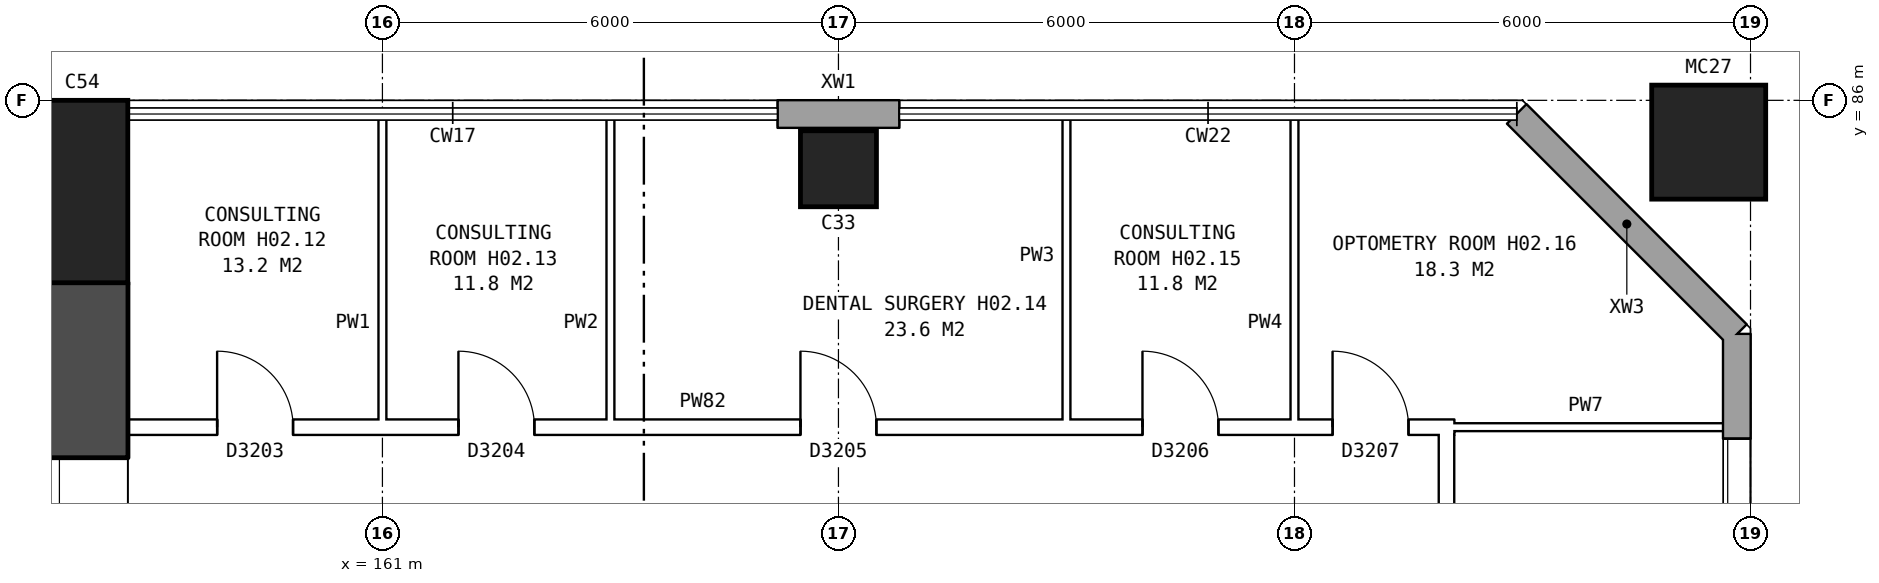
"""IFC4 building model, lengths in metres.
Left out: names, types, materials, properties, quantities, classifications, styles, units other than length and angle.
Written with IfcOpenShell. Run it as: python <this file> out.ifc"""

import sys

from ifc_helpers import new_model, si_unit, direction, frame, frame_2d, origin, origin_2d, place, context, subcontext, project, spatial, rectangle, hollow_rectangle, extrude, element, fill, save


model = new_model("IFC4")
c1 = context("Model", 3, precision=1e-05, world=origin(), true_north=direction((0.0, 1.0)))
c2 = subcontext(c1, "Body", "Model", "MODEL_VIEW")
j1 = project(units=[si_unit("LENGTHUNIT", "METRE"), si_unit("PLANEANGLEUNIT", "RADIAN")], contexts=[c1])
p1 = place(None, origin())
s1 = spatial("IfcSite", under=j1, at=p1, CompositionType="ELEMENT")
p2 = place(p1, origin())
s2 = spatial("IfcBuilding", under=s1, at=p2, CompositionType="ELEMENT")
p3 = place(p2, frame((0.0, 0.0, 10.1)))
s3 = spatial("IfcBuildingStorey", under=s2, at=p3, CompositionType="ELEMENT", Elevation=10.1)
p4 = place(p3, frame((157.05, 84.8, -0.3), z_axis=(0.0, 0.0, 1.0), x_axis=(1.0, 0.0, 0.0)))
e1 = element("IfcColumn", 1, at=p4, inside=s3, PredefinedType="COLUMN", context=c2, shape_type="SweptSolid", body=[
    extrude(rectangle(XDim=1.2, YDim=2.4, at=origin_2d()), origin(), (0.0, 0.0, 1.0), 4.4),
])
p5 = place(p3, frame((157.05, 56.4, -0.3), z_axis=(0.0, 0.0, 1.0), x_axis=(0.0, 1.0, 0.0)))
e2 = element("IfcWall", 2, at=p5, inside=s3, PredefinedType="SHEAR", context=c2, shape_type="SweptSolid", body=[
    extrude(rectangle(XDim=27.2, YDim=1.2, at=frame_2d((13.6, 0.0))), origin(), (0.0, 0.0, 1.0), 4.4),
])
p6 = place(p5, frame((2.3, 0.0, 0.8)))
e3 = element("IfcOpeningElement", 3, at=p6, cuts=e2, PredefinedType="OPENING", context=c2, shape_type="SweptSolid", body=[
    extrude(rectangle(XDim=1.6, YDim=1.8, at=frame_2d((0.8, 0.9))), frame((0.0, 0.61, 0.0), z_axis=(0.0, -1.0, 0.0), x_axis=(1.0, 0.0, 0.0)), (0.0, 0.0, 1.0), 1.22),
])
p7 = place(p5, frame((5.3, 0.0, 0.8)))
e4 = element("IfcOpeningElement", 4, at=p7, cuts=e2, PredefinedType="OPENING", context=c2, shape_type="SweptSolid", body=[
    extrude(rectangle(XDim=1.6, YDim=1.8, at=frame_2d((0.8, 0.9))), frame((0.0, 0.61, 0.0), z_axis=(0.0, -1.0, 0.0), x_axis=(1.0, 0.0, 0.0)), (0.0, 0.0, 1.0), 1.22),
])
p8 = place(p5, frame((8.3, 0.0, 0.8)))
e5 = element("IfcOpeningElement", 5, at=p8, cuts=e2, PredefinedType="OPENING", context=c2, shape_type="SweptSolid", body=[
    extrude(rectangle(XDim=1.6, YDim=1.8, at=frame_2d((0.8, 0.9))), frame((0.0, 0.61, 0.0), z_axis=(0.0, -1.0, 0.0), x_axis=(1.0, 0.0, 0.0)), (0.0, 0.0, 1.0), 1.22),
])
p9 = place(p5, frame((11.3, 0.0, 0.8)))
e6 = element("IfcOpeningElement", 6, at=p9, cuts=e2, PredefinedType="OPENING", context=c2, shape_type="SweptSolid", body=[
    extrude(rectangle(XDim=1.6, YDim=1.8, at=frame_2d((0.8, 0.9))), frame((0.0, 0.61, 0.0), z_axis=(0.0, -1.0, 0.0), x_axis=(1.0, 0.0, 0.0)), (0.0, 0.0, 1.0), 1.22),
])
p10 = place(p5, frame((14.3, 0.0, 0.8)))
e7 = element("IfcOpeningElement", 7, at=p10, cuts=e2, PredefinedType="OPENING", context=c2, shape_type="SweptSolid", body=[
    extrude(rectangle(XDim=1.6, YDim=1.8, at=frame_2d((0.8, 0.9))), frame((0.0, 0.61, 0.0), z_axis=(0.0, -1.0, 0.0), x_axis=(1.0, 0.0, 0.0)), (0.0, 0.0, 1.0), 1.22),
])
p11 = place(p5, frame((17.3, 0.0, 0.8)))
e8 = element("IfcOpeningElement", 8, at=p11, cuts=e2, PredefinedType="OPENING", context=c2, shape_type="SweptSolid", body=[
    extrude(rectangle(XDim=1.6, YDim=1.8, at=frame_2d((0.8, 0.9))), frame((0.0, 0.61, 0.0), z_axis=(0.0, -1.0, 0.0), x_axis=(1.0, 0.0, 0.0)), (0.0, 0.0, 1.0), 1.22),
])
p12 = place(p5, frame((20.3, 0.0, 0.8)))
e9 = element("IfcOpeningElement", 9, at=p12, cuts=e2, PredefinedType="OPENING", context=c2, shape_type="SweptSolid", body=[
    extrude(rectangle(XDim=1.6, YDim=1.8, at=frame_2d((0.8, 0.9))), frame((0.0, 0.61, 0.0), z_axis=(0.0, -1.0, 0.0), x_axis=(1.0, 0.0, 0.0)), (0.0, 0.0, 1.0), 1.22),
])
p13 = place(p5, frame((23.3, 0.0, 0.8)))
e10 = element("IfcOpeningElement", 10, at=p13, cuts=e2, PredefinedType="OPENING", context=c2, shape_type="SweptSolid", body=[
    extrude(rectangle(XDim=1.6, YDim=1.8, at=frame_2d((0.8, 0.9))), frame((0.0, 0.61, 0.0), z_axis=(0.0, -1.0, 0.0), x_axis=(1.0, 0.0, 0.0)), (0.0, 0.0, 1.0), 1.22),
])
p14 = place(p3, frame((167.0, 85.1, 0.0), z_axis=(0.0, 0.0, 1.0), x_axis=(1.0, 0.0, 0.0)))
e11 = element("IfcColumn", 11, at=p14, inside=s3, PredefinedType="COLUMN", context=c2, shape_type="SweptSolid", body=[
    extrude(rectangle(XDim=1.0, YDim=1.0, at=origin_2d()), origin(), (0.0, 0.0, 1.0), 4.3),
])
p15 = place(p3, frame((178.45, 85.45, 0.0), z_axis=(0.0, 0.0, 1.0), x_axis=(1.0, 0.0, 0.0)))
e12 = element("IfcColumn", 12, at=p15, inside=s3, PredefinedType="COLUMN", context=c2, shape_type="SweptSolid", body=[
    extrude(hollow_rectangle(XDim=1.5, YDim=1.5, WallThickness=0.08, at=origin_2d()), origin(), (0.0, 0.0, 1.0), 4.6),
])
p16 = place(p3, frame((178.82, 57.075, 0.0), z_axis=(0.0, 0.0, 1.0), x_axis=(0.0, 1.0, 0.0)))
e13 = element("IfcWall", 13, at=p16, inside=s3, PredefinedType="STANDARD", context=c2, shape_type="SweptSolid", body=[
    extrude(rectangle(XDim=25.851, YDim=0.36, at=frame_2d((12.925, 0.0))), origin(), (0.0, 0.0, 1.0), 4.3),
])
p17 = place(p16, frame((1.375, 0.0, 0.8)))
e14 = element("IfcOpeningElement", 14, at=p17, cuts=e13, PredefinedType="OPENING", context=c2, shape_type="SweptSolid", body=[
    extrude(rectangle(XDim=1.6, YDim=1.5, at=frame_2d((0.8, 0.75))), frame((0.0, 0.19, 0.0), z_axis=(0.0, -1.0, 0.0), x_axis=(1.0, 0.0, 0.0)), (0.0, 0.0, 1.0), 0.38),
])
p18 = place(p16, frame((4.375, 0.0, 0.8)))
e15 = element("IfcOpeningElement", 15, at=p18, cuts=e13, PredefinedType="OPENING", context=c2, shape_type="SweptSolid", body=[
    extrude(rectangle(XDim=0.6, YDim=0.9, at=frame_2d((0.3, 0.45))), frame((0.0, 0.19, 0.0), z_axis=(0.0, -1.0, 0.0), x_axis=(1.0, 0.0, 0.0)), (0.0, 0.0, 1.0), 0.38),
])
p19 = place(p16, frame((7.375, 0.0, 1.7)))
e16 = element("IfcOpeningElement", 16, at=p19, cuts=e13, PredefinedType="OPENING", context=c2, shape_type="SweptSolid", body=[
    extrude(rectangle(XDim=1.0, YDim=0.9, at=frame_2d((0.5, 0.45))), frame((0.0, 0.19, 0.0), z_axis=(0.0, -1.0, 0.0), x_axis=(1.0, 0.0, 0.0)), (0.0, 0.0, 1.0), 0.38),
])
p20 = place(p16, frame((10.625, 0.0, 0.8)))
e17 = element("IfcOpeningElement", 17, at=p20, cuts=e13, PredefinedType="OPENING", context=c2, shape_type="SweptSolid", body=[
    extrude(rectangle(XDim=1.6, YDim=1.8, at=frame_2d((0.8, 0.9))), frame((0.0, 0.19, 0.0), z_axis=(0.0, -1.0, 0.0), x_axis=(1.0, 0.0, 0.0)), (0.0, 0.0, 1.0), 0.38),
])
p21 = place(p16, frame((13.625, 0.0, 0.8)))
e18 = element("IfcOpeningElement", 18, at=p21, cuts=e13, PredefinedType="OPENING", context=c2, shape_type="SweptSolid", body=[
    extrude(rectangle(XDim=1.6, YDim=1.8, at=frame_2d((0.8, 0.9))), frame((0.0, 0.19, 0.0), z_axis=(0.0, -1.0, 0.0), x_axis=(1.0, 0.0, 0.0)), (0.0, 0.0, 1.0), 0.38),
])
p22 = place(p16, frame((16.375, 0.0, 1.4)))
e19 = element("IfcOpeningElement", 19, at=p22, cuts=e13, PredefinedType="OPENING", context=c2, shape_type="SweptSolid", body=[
    extrude(rectangle(XDim=1.0, YDim=1.2, at=frame_2d((0.5, 0.6))), frame((0.0, 0.19, 0.0), z_axis=(0.0, -1.0, 0.0), x_axis=(1.0, 0.0, 0.0)), (0.0, 0.0, 1.0), 0.38),
])
p23 = place(p16, frame((20.725, 0.0, 0.8)))
e20 = element("IfcOpeningElement", 20, at=p23, cuts=e13, PredefinedType="OPENING", context=c2, shape_type="SweptSolid", body=[
    extrude(rectangle(XDim=0.6, YDim=0.9, at=frame_2d((0.3, 0.45))), frame((0.0, 0.19, 0.0), z_axis=(0.0, -1.0, 0.0), x_axis=(1.0, 0.0, 0.0)), (0.0, 0.0, 1.0), 0.38),
])
p24 = place(p16, frame((21.775, 0.0, 0.8)))
e21 = element("IfcOpeningElement", 21, at=p24, cuts=e13, PredefinedType="OPENING", context=c2, shape_type="SweptSolid", body=[
    extrude(rectangle(XDim=0.8, YDim=1.2, at=frame_2d((0.4, 0.6))), frame((0.0, 0.19, 0.0), z_axis=(0.0, -1.0, 0.0), x_axis=(1.0, 0.0, 0.0)), (0.0, 0.0, 1.0), 0.38),
])
p25 = place(p16, frame((3.275, 0.0, 0.8)))
e22 = element("IfcOpeningElement", 22, at=p25, cuts=e13, PredefinedType="OPENING", context=c2, shape_type="SweptSolid", body=[
    extrude(rectangle(XDim=0.8, YDim=1.2, at=frame_2d((0.4, 0.6))), frame((0.0, 0.19, 0.0), z_axis=(0.0, -1.0, 0.0), x_axis=(1.0, 0.0, 0.0)), (0.0, 0.0, 1.0), 0.38),
])
p26 = place(p16, frame((8.675, 0.0, 1.4)))
e23 = element("IfcOpeningElement", 23, at=p26, cuts=e13, PredefinedType="OPENING", context=c2, shape_type="SweptSolid", body=[
    extrude(rectangle(XDim=1.6, YDim=1.2, at=frame_2d((0.8, 0.6))), frame((0.0, 0.19, 0.0), z_axis=(0.0, -1.0, 0.0), x_axis=(1.0, 0.0, 0.0)), (0.0, 0.0, 1.0), 0.38),
])
p27 = place(p16, frame((17.675, 0.0, 1.7)))
e24 = element("IfcOpeningElement", 24, at=p27, cuts=e13, PredefinedType="OPENING", context=c2, shape_type="SweptSolid", body=[
    extrude(rectangle(XDim=0.8, YDim=0.9, at=frame_2d((0.4, 0.45))), frame((0.0, 0.19, 0.0), z_axis=(0.0, -1.0, 0.0), x_axis=(1.0, 0.0, 0.0)), (0.0, 0.0, 1.0), 0.38),
])
p28 = place(p16, frame((22.875, 0.0, 0.8)))
e25 = element("IfcOpeningElement", 25, at=p28, cuts=e13, PredefinedType="OPENING", context=c2, shape_type="SweptSolid", body=[
    extrude(rectangle(XDim=1.6, YDim=1.5, at=frame_2d((0.8, 0.75))), frame((0.0, 0.19, 0.0), z_axis=(0.0, -1.0, 0.0), x_axis=(1.0, 0.0, 0.0)), (0.0, 0.0, 1.0), 0.38),
])
p29 = place(p3, frame((178.82, 82.925, 0.0), z_axis=(0.0, 0.0, 1.0), x_axis=(-0.707106781187, 0.707106781187, 0.0)))
e26 = element("IfcWall", 26, at=p29, inside=s3, PredefinedType="STANDARD", context=c2, shape_type="SweptSolid", body=[
    extrude(rectangle(XDim=4.094, YDim=0.36, at=frame_2d((2.047, 0.0))), origin(), (0.0, 0.0, 1.0), 4.3),
])
p30 = place(p3, frame((167.8, 85.82, 0.0), z_axis=(0.0, 0.0, 1.0), x_axis=(-1.0, 0.0, 0.0)))
e27 = element("IfcWall", 27, at=p30, inside=s3, PredefinedType="STANDARD", context=c2, shape_type="SweptSolid", body=[
    extrude(rectangle(XDim=1.6, YDim=0.36, at=frame_2d((0.8, 0.0))), origin(), (0.0, 0.0, 1.0), 4.3),
])
p31 = place(p3, frame((157.53, 81.7, 0.0), z_axis=(0.0, 0.0, 1.0), x_axis=(1.0, 0.0, 0.0)))
e28 = element("IfcWall", 28, at=p31, inside=s3, PredefinedType="PARTITIONING", context=c2, shape_type="SweptSolid", body=[
    extrude(rectangle(XDim=17.572, YDim=0.2, at=frame_2d((8.786, 0.0))), origin(), (0.0, 0.0, 1.0), 4.3),
])
p32 = place(p31, frame((1.295, 0.0, 0.0)))
e29 = element("IfcOpeningElement", 29, at=p32, cuts=e28, PredefinedType="OPENING", context=c2, shape_type="SweptSolid", body=[
    extrude(rectangle(XDim=1.0, YDim=2.1, at=frame_2d((0.5, 1.05))), frame((0.0, 0.11, 0.0), z_axis=(0.0, -1.0, 0.0), x_axis=(1.0, 0.0, 0.0)), (0.0, 0.0, 1.0), 0.22),
])
p33 = place(p31, frame((4.47, 0.0, 0.0)))
e30 = element("IfcOpeningElement", 30, at=p33, cuts=e28, PredefinedType="OPENING", context=c2, shape_type="SweptSolid", body=[
    extrude(rectangle(XDim=1.0, YDim=2.1, at=frame_2d((0.5, 1.05))), frame((0.0, 0.11, 0.0), z_axis=(0.0, -1.0, 0.0), x_axis=(1.0, 0.0, 0.0)), (0.0, 0.0, 1.0), 0.22),
])
p34 = place(p31, frame((8.97, 0.0, 0.0)))
e31 = element("IfcOpeningElement", 31, at=p34, cuts=e28, PredefinedType="OPENING", context=c2, shape_type="SweptSolid", body=[
    extrude(rectangle(XDim=1.0, YDim=2.1, at=frame_2d((0.5, 1.05))), frame((0.0, 0.11, 0.0), z_axis=(0.0, -1.0, 0.0), x_axis=(1.0, 0.0, 0.0)), (0.0, 0.0, 1.0), 0.22),
])
p35 = place(p31, frame((13.47, 0.0, 0.0)))
e32 = element("IfcOpeningElement", 32, at=p35, cuts=e28, PredefinedType="OPENING", context=c2, shape_type="SweptSolid", body=[
    extrude(rectangle(XDim=1.0, YDim=2.1, at=frame_2d((0.5, 1.05))), frame((0.0, 0.11, 0.0), z_axis=(0.0, -1.0, 0.0), x_axis=(1.0, 0.0, 0.0)), (0.0, 0.0, 1.0), 0.22),
])
p36 = place(p31, frame((15.971, 0.0, 0.0)))
e33 = element("IfcOpeningElement", 33, at=p36, cuts=e28, PredefinedType="OPENING", context=c2, shape_type="SweptSolid", body=[
    extrude(rectangle(XDim=1.0, YDim=2.1, at=frame_2d((0.5, 1.05))), frame((0.0, 0.11, 0.0), z_axis=(0.0, -1.0, 0.0), x_axis=(1.0, 0.0, 0.0)), (0.0, 0.0, 1.0), 0.22),
])
p37 = place(p3, frame((174.9, 81.7, 0.0), z_axis=(0.0, 0.0, 1.0), x_axis=(1.0, 0.0, 0.0)))
e34 = element("IfcWall", 34, at=p37, inside=s3, PredefinedType="PARTITIONING", context=c2, shape_type="SweptSolid", body=[
    extrude(rectangle(XDim=3.86, YDim=0.1, at=frame_2d((1.93, 0.0))), origin(), (0.0, 0.0, 1.0), 4.3),
])
for number, where, z_axis, x_axis in (
    (35, (161.0, 81.6, 0.0), (0.0, 0.0, 1.0), (0.0, 1.0, 0.0)),
    (36, (164.0, 81.6, 0.0), (0.0, 0.0, 1.0), (0.0, 1.0, 0.0)),
    (37, (170.0, 81.6, 0.0), (0.0, 0.0, 1.0), (0.0, 1.0, 0.0)),
    (38, (173.0, 81.6, 0.0), (0.0, 0.0, 1.0), (0.0, 1.0, 0.0)),
):
    element("IfcWall", number, at=place(p3, frame(where, z_axis=z_axis, x_axis=x_axis)), inside=s3, PredefinedType="PARTITIONING", context=c2, shape_type="SweptSolid", body=[
        extrude(rectangle(XDim=4.16, YDim=0.1, at=frame_2d((2.08, 0.0))), origin(), (0.0, 0.0, 1.0), 4.3),
    ])
p38 = place(p3, frame((175.0, 58.2, 0.0), z_axis=(0.0, 0.0, 1.0), x_axis=(0.0, 1.0, 0.0)))
e39 = element("IfcWall", 39, at=p38, inside=s3, PredefinedType="PARTITIONING", context=c2, shape_type="SweptSolid", body=[
    extrude(rectangle(XDim=23.6, YDim=0.2, at=frame_2d((11.8, 0.0))), origin(), (0.0, 0.0, 1.0), 4.3),
])
p39 = place(p38, frame((1.1, 0.0, 0.0)))
e40 = element("IfcOpeningElement", 40, at=p39, cuts=e39, PredefinedType="OPENING", context=c2, shape_type="SweptSolid", body=[
    extrude(rectangle(XDim=1.0, YDim=2.1, at=frame_2d((0.5, 1.05))), frame((0.0, 0.11, 0.0), z_axis=(0.0, -1.0, 0.0), x_axis=(1.0, 0.0, 0.0)), (0.0, 0.0, 1.0), 0.22),
])
p40 = place(p38, frame((4.1, 0.0, 0.0)))
e41 = element("IfcOpeningElement", 41, at=p40, cuts=e39, PredefinedType="OPENING", context=c2, shape_type="SweptSolid", body=[
    extrude(rectangle(XDim=1.0, YDim=2.1, at=frame_2d((0.5, 1.05))), frame((0.0, 0.11, 0.0), z_axis=(0.0, -1.0, 0.0), x_axis=(1.0, 0.0, 0.0)), (0.0, 0.0, 1.0), 0.22),
])
p41 = place(p38, frame((8.525, 0.0, 0.0)))
e42 = element("IfcOpeningElement", 42, at=p41, cuts=e39, PredefinedType="OPENING", context=c2, shape_type="SweptSolid", body=[
    extrude(rectangle(XDim=1.0, YDim=2.1, at=frame_2d((0.5, 1.05))), frame((0.0, 0.11, 0.0), z_axis=(0.0, -1.0, 0.0), x_axis=(1.0, 0.0, 0.0)), (0.0, 0.0, 1.0), 0.22),
])
p42 = place(p38, frame((13.025, 0.0, 0.0)))
e43 = element("IfcOpeningElement", 43, at=p42, cuts=e39, PredefinedType="OPENING", context=c2, shape_type="SweptSolid", body=[
    extrude(rectangle(XDim=1.0, YDim=2.1, at=frame_2d((0.5, 1.05))), frame((0.0, 0.11, 0.0), z_axis=(0.0, -1.0, 0.0), x_axis=(1.0, 0.0, 0.0)), (0.0, 0.0, 1.0), 0.22),
])
p43 = place(p38, frame((16.1, 0.0, 0.0)))
e44 = element("IfcOpeningElement", 44, at=p43, cuts=e39, PredefinedType="OPENING", context=c2, shape_type="SweptSolid", body=[
    extrude(rectangle(XDim=1.0, YDim=2.1, at=frame_2d((0.5, 1.05))), frame((0.0, 0.11, 0.0), z_axis=(0.0, -1.0, 0.0), x_axis=(1.0, 0.0, 0.0)), (0.0, 0.0, 1.0), 0.22),
])
p44 = place(p38, frame((20.3, 0.0, 0.0)))
e45 = element("IfcOpeningElement", 45, at=p44, cuts=e39, PredefinedType="OPENING", context=c2, shape_type="SweptSolid", body=[
    extrude(rectangle(XDim=1.0, YDim=2.1, at=frame_2d((0.5, 1.05))), frame((0.0, 0.11, 0.0), z_axis=(0.0, -1.0, 0.0), x_axis=(1.0, 0.0, 0.0)), (0.0, 0.0, 1.0), 0.22),
])
p45 = place(p13, origin())
e46 = element("IfcWindow", 46, at=p45, inside=s3, PartitioningType="SINGLE_PANEL", PredefinedType="WINDOW", context=c2, shape_type="SweptSolid", body=[
    extrude(rectangle(XDim=1.6, YDim=1.8, at=frame_2d((0.8, 0.9))), frame((0.0, 0.33, 0.0), z_axis=(0.0, -1.0, 0.0), x_axis=(1.0, 0.0, 0.0)), (0.0, 0.0, 1.0), 0.06),
])
fill(e10, e46)
p46 = place(p32, origin())
e47 = element("IfcDoor", 47, at=p46, inside=s3, OperationType="SINGLE_SWING_LEFT", PredefinedType="DOOR", context=c2, shape_type="SweptSolid", body=[
    extrude(rectangle(XDim=1.0, YDim=2.1, at=frame_2d((0.5, 1.05))), frame((0.0, 0.025, 0.0), z_axis=(0.0, -1.0, 0.0), x_axis=(1.0, 0.0, 0.0)), (0.0, 0.0, 1.0), 0.05),
])
fill(e29, e47)
p47 = place(p33, origin())
e48 = element("IfcDoor", 48, at=p47, inside=s3, OperationType="SINGLE_SWING_LEFT", PredefinedType="DOOR", context=c2, shape_type="SweptSolid", body=[
    extrude(rectangle(XDim=1.0, YDim=2.1, at=frame_2d((0.5, 1.05))), frame((0.0, 0.025, 0.0), z_axis=(0.0, -1.0, 0.0), x_axis=(1.0, 0.0, 0.0)), (0.0, 0.0, 1.0), 0.05),
])
fill(e30, e48)
p48 = place(p34, origin())
e49 = element("IfcDoor", 49, at=p48, inside=s3, OperationType="SINGLE_SWING_LEFT", PredefinedType="DOOR", context=c2, shape_type="SweptSolid", body=[
    extrude(rectangle(XDim=1.0, YDim=2.1, at=frame_2d((0.5, 1.05))), frame((0.0, 0.025, 0.0), z_axis=(0.0, -1.0, 0.0), x_axis=(1.0, 0.0, 0.0)), (0.0, 0.0, 1.0), 0.05),
])
fill(e31, e49)
p49 = place(p35, origin())
e50 = element("IfcDoor", 50, at=p49, inside=s3, OperationType="SINGLE_SWING_LEFT", PredefinedType="DOOR", context=c2, shape_type="SweptSolid", body=[
    extrude(rectangle(XDim=1.0, YDim=2.1, at=frame_2d((0.5, 1.05))), frame((0.0, 0.025, 0.0), z_axis=(0.0, -1.0, 0.0), x_axis=(1.0, 0.0, 0.0)), (0.0, 0.0, 1.0), 0.05),
])
fill(e32, e50)
p50 = place(p36, origin())
e51 = element("IfcDoor", 51, at=p50, inside=s3, OperationType="SINGLE_SWING_LEFT", PredefinedType="DOOR", context=c2, shape_type="SweptSolid", body=[
    extrude(rectangle(XDim=1.0, YDim=2.1, at=frame_2d((0.5, 1.05))), frame((0.0, 0.025, 0.0), z_axis=(0.0, -1.0, 0.0), x_axis=(1.0, 0.0, 0.0)), (0.0, 0.0, 1.0), 0.05),
])
fill(e33, e51)
p51 = place(p28, origin())
e52 = element("IfcWindow", 52, at=p51, inside=s3, PartitioningType="SINGLE_PANEL", PredefinedType="WINDOW", context=c2, shape_type="SweptSolid", body=[
    extrude(rectangle(XDim=1.6, YDim=1.5, at=frame_2d((0.8, 0.75))), frame((0.0, 0.15, 0.0), z_axis=(0.0, -1.0, 0.0), x_axis=(1.0, 0.0, 0.0)), (0.0, 0.0, 1.0), 0.06),
])
fill(e25, e52)
save(model, sys.argv[1])
